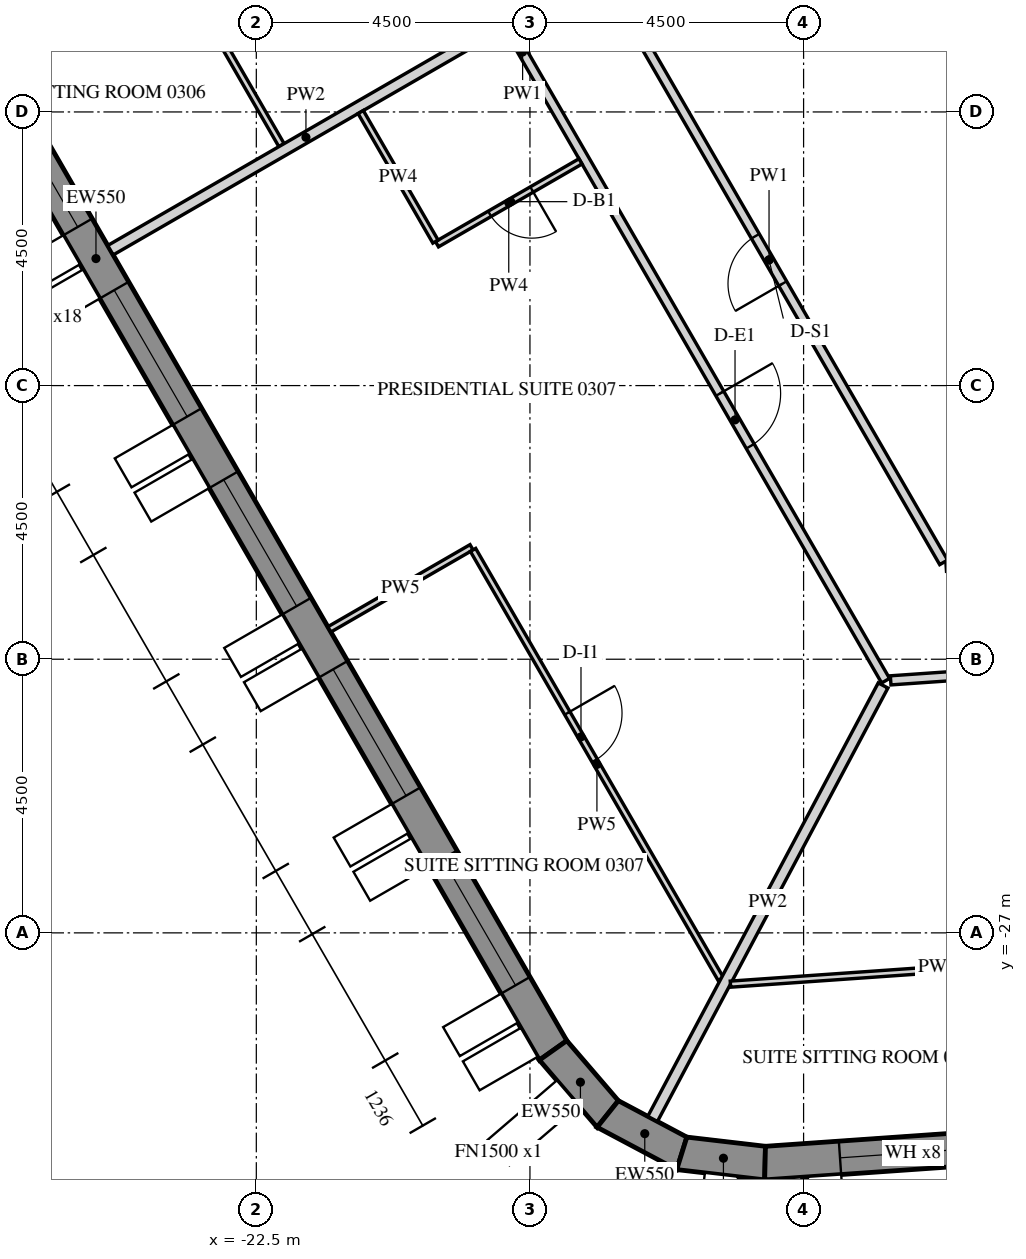
"""IFC4 building model, lengths in metres.
Left out: names, types, materials, properties, quantities, classifications, styles, units other than length and angle.
Written with IfcOpenShell. Run it as: python <this file> out.ifc"""

import sys

from ifc_helpers import new_model, si_unit, direction, frame, frame_2d, origin, place, context, subcontext, project, spatial, polyline, rectangle, outline, extrude, element, fill, save


model = new_model("IFC4")
c1 = context("Model", 3, precision=1e-05, world=origin(), true_north=direction((0.0, 1.0)))
c2 = subcontext(c1, "Body", "Model", "MODEL_VIEW")
j1 = project(units=[si_unit("LENGTHUNIT", "METRE"), si_unit("PLANEANGLEUNIT", "RADIAN")], contexts=[c1])
p1 = place(None, origin())
s1 = spatial("IfcSite", under=j1, at=p1, CompositionType="ELEMENT")
p2 = place(p1, origin())
s2 = spatial("IfcBuilding", under=s1, at=p2, CompositionType="ELEMENT")
p3 = place(p2, frame((0.0, 0.0, 60.9)))
s3 = spatial("IfcBuildingStorey", under=s2, at=p3, CompositionType="ELEMENT", Elevation=60.9)
p4 = place(p3, frame((-32.655, -2.89, -0.15), z_axis=(0.0, 0.0, 1.0), x_axis=(0.499997711317, -0.866026725152, 0.0)))
e1 = element("IfcWall", 1, at=p4, inside=s3, PredefinedType="SOLIDWALL", context=c2, shape_type="SweptSolid", body=[
    extrude(outline(polyline([(-0.022, -0.275), (30.097, -0.275), (30.045, 0.275), (0.022, 0.275), (-0.022, -0.275)])), origin(), (0.0, 0.0, 1.0), 3.9),
])
p5 = place(p4, frame((1.236, 0.0, 1.05)))
e2 = element("IfcOpeningElement", 2, at=p5, cuts=e1, PredefinedType="OPENING", context=c2, shape_type="SweptSolid", body=[
    extrude(rectangle(XDim=2.4, YDim=2.4, at=frame_2d((1.2, 1.2))), frame((0.0, 0.285, 0.0), z_axis=(0.0, -1.0, 0.0), x_axis=(1.0, 0.0, 0.0)), (0.0, 0.0, 1.0), 0.57),
])
p6 = place(p4, frame((4.835, 0.0, 1.05)))
e3 = element("IfcOpeningElement", 3, at=p6, cuts=e1, PredefinedType="OPENING", context=c2, shape_type="SweptSolid", body=[
    extrude(rectangle(XDim=2.4, YDim=2.4, at=frame_2d((1.2, 1.2))), frame((0.0, 0.285, 0.0), z_axis=(0.0, -1.0, 0.0), x_axis=(1.0, 0.0, 0.0)), (0.0, 0.0, 1.0), 0.57),
])
p7 = place(p4, frame((8.436, 0.0, 1.05)))
e4 = element("IfcOpeningElement", 4, at=p7, cuts=e1, PredefinedType="OPENING", context=c2, shape_type="SweptSolid", body=[
    extrude(rectangle(XDim=2.4, YDim=2.4, at=frame_2d((1.2, 1.2))), frame((0.0, 0.285, 0.0), z_axis=(0.0, -1.0, 0.0), x_axis=(1.0, 0.0, 0.0)), (0.0, 0.0, 1.0), 0.57),
])
p8 = place(p4, frame((12.035, 0.0, 1.05)))
e5 = element("IfcOpeningElement", 5, at=p8, cuts=e1, PredefinedType="OPENING", context=c2, shape_type="SweptSolid", body=[
    extrude(rectangle(XDim=2.4, YDim=2.4, at=frame_2d((1.2, 1.2))), frame((0.0, 0.285, 0.0), z_axis=(0.0, -1.0, 0.0), x_axis=(1.0, 0.0, 0.0)), (0.0, 0.0, 1.0), 0.57),
])
p9 = place(p4, frame((15.635, 0.0, 1.05)))
e6 = element("IfcOpeningElement", 6, at=p9, cuts=e1, PredefinedType="OPENING", context=c2, shape_type="SweptSolid", body=[
    extrude(rectangle(XDim=2.4, YDim=2.4, at=frame_2d((1.2, 1.2))), frame((0.0, 0.285, 0.0), z_axis=(0.0, -1.0, 0.0), x_axis=(1.0, 0.0, 0.0)), (0.0, 0.0, 1.0), 0.57),
])
p10 = place(p4, frame((19.236, 0.0, 1.05)))
e7 = element("IfcOpeningElement", 7, at=p10, cuts=e1, PredefinedType="OPENING", context=c2, shape_type="SweptSolid", body=[
    extrude(rectangle(XDim=2.4, YDim=2.4, at=frame_2d((1.2, 1.2))), frame((0.0, 0.285, 0.0), z_axis=(0.0, -1.0, 0.0), x_axis=(1.0, 0.0, 0.0)), (0.0, 0.0, 1.0), 0.57),
])
p11 = place(p4, frame((22.835, 0.0, 1.05)))
e8 = element("IfcOpeningElement", 8, at=p11, cuts=e1, PredefinedType="OPENING", context=c2, shape_type="SweptSolid", body=[
    extrude(rectangle(XDim=2.4, YDim=2.4, at=frame_2d((1.2, 1.2))), frame((0.0, 0.285, 0.0), z_axis=(0.0, -1.0, 0.0), x_axis=(1.0, 0.0, 0.0)), (0.0, 0.0, 1.0), 0.57),
])
p12 = place(p4, frame((26.436, 0.0, 1.05)))
e9 = element("IfcOpeningElement", 9, at=p12, cuts=e1, PredefinedType="OPENING", context=c2, shape_type="SweptSolid", body=[
    extrude(rectangle(XDim=2.4, YDim=2.4, at=frame_2d((1.2, 1.2))), frame((0.0, 0.285, 0.0), z_axis=(0.0, -1.0, 0.0), x_axis=(1.0, 0.0, 0.0)), (0.0, 0.0, 1.0), 0.57),
])
p13 = place(p3, frame((-17.619, -28.932, -0.15), z_axis=(0.0, 0.0, 1.0), x_axis=(0.651621950847, -0.758543890078, 0.0)))
e10 = element("IfcWall", 10, at=p13, inside=s3, PredefinedType="SOLIDWALL", context=c2, shape_type="SweptSolid", body=[
    extrude(outline(polyline([(-0.026, -0.275), (1.431, -0.275), (1.327, 0.275), (0.026, 0.275), (-0.026, -0.275)])), origin(), (0.0, 0.0, 1.0), 3.9),
])
p14 = place(p3, frame((-16.721, -29.979, -0.15), z_axis=(0.0, 0.0, 1.0), x_axis=(0.882994189209, -0.469383917304, 0.0)))
e11 = element("IfcWall", 11, at=p14, inside=s3, PredefinedType="SOLIDWALL", context=c2, shape_type="SweptSolid", body=[
    extrude(outline(polyline([(-0.052, -0.275), (1.431, -0.275), (1.327, 0.275), (0.052, 0.275), (-0.052, -0.275)])), origin(), (0.0, 0.0, 1.0), 3.9),
])
p15 = place(p3, frame((-15.503, -30.626, -0.15), z_axis=(0.0, 0.0, 1.0), x_axis=(0.993232537394, -0.11614269956, 0.0)))
e12 = element("IfcWall", 12, at=p15, inside=s3, PredefinedType="SOLIDWALL", context=c2, shape_type="SweptSolid", body=[
    extrude(outline(polyline([(-0.052, -0.275), (1.405, -0.275), (1.353, 0.275), (0.052, 0.275), (-0.052, -0.275)])), origin(), (0.0, 0.0, 1.0), 3.9),
])
p16 = place(p3, frame((-14.134, -30.786, -0.15), z_axis=(0.0, 0.0, 1.0), x_axis=(0.997564037441, 0.069756657061, 0.0)))
e13 = element("IfcWall", 13, at=p16, inside=s3, PredefinedType="SOLIDWALL", context=c2, shape_type="SweptSolid", body=[
    extrude(outline(polyline([(-0.026, -0.275), (30.094, -0.275), (30.049, 0.275), (0.026, 0.275), (-0.026, -0.275)])), origin(), (0.0, 0.0, 1.0), 3.9),
])
p17 = place(p16, frame((1.236, 0.0, 1.05)))
e14 = element("IfcOpeningElement", 14, at=p17, cuts=e13, PredefinedType="OPENING", context=c2, shape_type="SweptSolid", body=[
    extrude(rectangle(XDim=2.4, YDim=2.4, at=frame_2d((1.2, 1.2))), frame((0.0, 0.285, 0.0), z_axis=(0.0, -1.0, 0.0), x_axis=(1.0, 0.0, 0.0)), (0.0, 0.0, 1.0), 0.57),
])
p18 = place(p16, frame((4.835, 0.0, 1.05)))
e15 = element("IfcOpeningElement", 15, at=p18, cuts=e13, PredefinedType="OPENING", context=c2, shape_type="SweptSolid", body=[
    extrude(rectangle(XDim=2.4, YDim=2.4, at=frame_2d((1.2, 1.2))), frame((0.0, 0.285, 0.0), z_axis=(0.0, -1.0, 0.0), x_axis=(1.0, 0.0, 0.0)), (0.0, 0.0, 1.0), 0.57),
])
p19 = place(p16, frame((8.436, 0.0, 1.05)))
e16 = element("IfcOpeningElement", 16, at=p19, cuts=e13, PredefinedType="OPENING", context=c2, shape_type="SweptSolid", body=[
    extrude(rectangle(XDim=2.4, YDim=2.4, at=frame_2d((1.2, 1.2))), frame((0.0, 0.285, 0.0), z_axis=(0.0, -1.0, 0.0), x_axis=(1.0, 0.0, 0.0)), (0.0, 0.0, 1.0), 0.57),
])
p20 = place(p16, frame((12.035, 0.0, 1.05)))
e17 = element("IfcOpeningElement", 17, at=p20, cuts=e13, PredefinedType="OPENING", context=c2, shape_type="SweptSolid", body=[
    extrude(rectangle(XDim=2.4, YDim=2.4, at=frame_2d((1.2, 1.2))), frame((0.0, 0.285, 0.0), z_axis=(0.0, -1.0, 0.0), x_axis=(1.0, 0.0, 0.0)), (0.0, 0.0, 1.0), 0.57),
])
p21 = place(p16, frame((15.635, 0.0, 1.05)))
e18 = element("IfcOpeningElement", 18, at=p21, cuts=e13, PredefinedType="OPENING", context=c2, shape_type="SweptSolid", body=[
    extrude(rectangle(XDim=2.4, YDim=2.4, at=frame_2d((1.2, 1.2))), frame((0.0, 0.285, 0.0), z_axis=(0.0, -1.0, 0.0), x_axis=(1.0, 0.0, 0.0)), (0.0, 0.0, 1.0), 0.57),
])
p22 = place(p16, frame((19.236, 0.0, 1.05)))
e19 = element("IfcOpeningElement", 19, at=p22, cuts=e13, PredefinedType="OPENING", context=c2, shape_type="SweptSolid", body=[
    extrude(rectangle(XDim=2.4, YDim=2.4, at=frame_2d((1.2, 1.2))), frame((0.0, 0.285, 0.0), z_axis=(0.0, -1.0, 0.0), x_axis=(1.0, 0.0, 0.0)), (0.0, 0.0, 1.0), 0.57),
])
p23 = place(p16, frame((22.835, 0.0, 1.05)))
e20 = element("IfcOpeningElement", 20, at=p23, cuts=e13, PredefinedType="OPENING", context=c2, shape_type="SweptSolid", body=[
    extrude(rectangle(XDim=2.4, YDim=2.4, at=frame_2d((1.2, 1.2))), frame((0.0, 0.285, 0.0), z_axis=(0.0, -1.0, 0.0), x_axis=(1.0, 0.0, 0.0)), (0.0, 0.0, 1.0), 0.57),
])
p24 = place(p16, frame((26.436, 0.0, 1.05)))
e21 = element("IfcOpeningElement", 21, at=p24, cuts=e13, PredefinedType="OPENING", context=c2, shape_type="SweptSolid", body=[
    extrude(rectangle(XDim=2.4, YDim=2.4, at=frame_2d((1.2, 1.2))), frame((0.0, 0.285, 0.0), z_axis=(0.0, -1.0, 0.0), x_axis=(1.0, 0.0, 0.0)), (0.0, 0.0, 1.0), 0.57),
])
p25 = place(p3, frame((-15.819, 0.0, -0.15), z_axis=(0.0, 0.0, 1.0), x_axis=(0.499999880136, -0.866025472988, 0.0)))
e22 = element("IfcWall", 22, at=p25, inside=s3, PredefinedType="SHEAR", context=c2, shape_type="SweptSolid", body=[
    extrude(outline(polyline([(-0.173, -0.3), (15.993, -0.3), (15.646, 0.3), (0.173, 0.3), (-0.173, -0.3)])), origin(), (0.0, 0.0, 1.0), 3.9),
])
p26 = place(p25, frame((6.981, 0.0, 0.15)))
e23 = element("IfcOpeningElement", 23, at=p26, cuts=e22, PredefinedType="OPENING", context=c2, shape_type="SweptSolid", body=[
    extrude(rectangle(XDim=1.8, YDim=2.4, at=frame_2d((0.9, 1.2))), frame((0.0, 0.31, 0.0), z_axis=(0.0, -1.0, 0.0), x_axis=(1.0, 0.0, 0.0)), (0.0, 0.0, 1.0), 0.62),
])
p27 = place(p3, frame((-24.09, -2.175, 0.0), z_axis=(0.0, 0.0, 1.0), x_axis=(0.499996832073, -0.86602723278, 0.0)))
e24 = element("IfcWall", 24, at=p27, inside=s3, PredefinedType="PARTITIONING", context=c2, shape_type="SweptSolid", body=[
    extrude(rectangle(XDim=23.877, YDim=0.15, at=frame_2d((11.938, 0.0))), origin(), (0.0, 0.0, 1.0), 2.988),
])
p28 = place(p27, frame((6.443, 0.0, 0.0)))
e25 = element("IfcOpeningElement", 25, at=p28, cuts=e24, PredefinedType="OPENING", context=c2, shape_type="SweptSolid", body=[
    extrude(rectangle(XDim=1.0, YDim=2.1, at=frame_2d((0.5, 1.05))), frame((0.0, 0.085, 0.0), z_axis=(0.0, -1.0, 0.0), x_axis=(1.0, 0.0, 0.0)), (0.0, 0.0, 1.0), 0.17),
])
p29 = place(p27, frame((18.425, 0.0, 0.0)))
e26 = element("IfcOpeningElement", 26, at=p29, cuts=e24, PredefinedType="OPENING", context=c2, shape_type="SweptSolid", body=[
    extrude(rectangle(XDim=1.0, YDim=2.1, at=frame_2d((0.5, 1.05))), frame((0.0, 0.085, 0.0), z_axis=(0.0, -1.0, 0.0), x_axis=(1.0, 0.0, 0.0)), (0.0, 0.0, 1.0), 0.17),
])
p30 = place(p3, frame((-12.068, -22.847, 0.0), z_axis=(0.0, 0.0, 1.0), x_axis=(0.99756437486, 0.069751831595, 0.0)))
e27 = element("IfcWall", 27, at=p30, inside=s3, PredefinedType="PARTITIONING", context=c2, shape_type="SweptSolid", body=[
    extrude(rectangle(XDim=22.002, YDim=0.15, at=frame_2d((11.001, 0.0))), origin(), (0.0, 0.0, 1.0), 2.988),
])
p31 = place(p30, frame((4.469, 0.0, 0.0)))
e28 = element("IfcOpeningElement", 28, at=p31, cuts=e27, PredefinedType="OPENING", context=c2, shape_type="SweptSolid", body=[
    extrude(rectangle(XDim=1.0, YDim=2.1, at=frame_2d((0.5, 1.05))), frame((0.0, 0.085, 0.0), z_axis=(0.0, -1.0, 0.0), x_axis=(1.0, 0.0, 0.0)), (0.0, 0.0, 1.0), 0.17),
])
p32 = place(p30, frame((17.912, 0.0, 0.0)))
e29 = element("IfcOpeningElement", 29, at=p32, cuts=e27, PredefinedType="OPENING", context=c2, shape_type="SweptSolid", body=[
    extrude(rectangle(XDim=1.0, YDim=2.1, at=frame_2d((0.5, 1.05))), frame((0.0, 0.085, 0.0), z_axis=(0.0, -1.0, 0.0), x_axis=(1.0, 0.0, 0.0)), (0.0, 0.0, 1.0), 0.17),
])
p33 = place(p3, frame((-0.825, -20.257, 0.0), z_axis=(0.0, 0.0, 1.0), x_axis=(-0.9975635143, -0.069764137903, 0.0)))
e30 = element("IfcWall", 30, at=p33, inside=s3, PredefinedType="PARTITIONING", context=c2, shape_type="SweptSolid", body=[
    extrude(rectangle(XDim=10.355, YDim=0.15, at=frame_2d((5.177, 0.0))), origin(), (0.0, 0.0, 1.0), 2.988),
])
p34 = place(p3, frame((-11.197, -20.907, 0.0), z_axis=(0.0, 0.0, 1.0), x_axis=(-0.500004557924, 0.86602277225, 0.0)))
e31 = element("IfcWall", 31, at=p34, inside=s3, PredefinedType="PARTITIONING", context=c2, shape_type="SweptSolid", body=[
    extrude(rectangle(XDim=11.487, YDim=0.15, at=frame_2d((5.743, 0.0))), origin(), (0.0, 0.0, 1.0), 2.988),
])
p35 = place(p34, frame((5.293, 0.0, 0.0)))
e32 = element("IfcOpeningElement", 32, at=p35, cuts=e31, PredefinedType="OPENING", context=c2, shape_type="SweptSolid", body=[
    extrude(rectangle(XDim=0.9, YDim=2.1, at=frame_2d((0.45, 1.05))), frame((0.0, 0.085, 0.0), z_axis=(0.0, -1.0, 0.0), x_axis=(1.0, 0.0, 0.0)), (0.0, 0.0, 1.0), 0.17),
])
p36 = place(p3, frame((-25.616, -7.932, 0.0), z_axis=(0.0, 0.0, 1.0), x_axis=(0.499995846692, -0.866027801685, 0.0)))
e33 = element("IfcWall", 33, at=p36, inside=s3, PredefinedType="PARTITIONING", context=c2, shape_type="SweptSolid", body=[
    extrude(rectangle(XDim=7.06, YDim=0.1, at=frame_2d((3.53, 0.0))), origin(), (0.0, 0.0, 1.0), 2.988),
])
p37 = place(p36, frame((3.1, 0.0, 0.0)))
e34 = element("IfcOpeningElement", 34, at=p37, cuts=e33, PredefinedType="OPENING", context=c2, shape_type="SweptSolid", body=[
    extrude(rectangle(XDim=0.9, YDim=2.1, at=frame_2d((0.45, 1.05))), frame((0.0, 0.06, 0.0), z_axis=(0.0, -1.0, 0.0), x_axis=(1.0, 0.0, 0.0)), (0.0, 0.0, 1.0), 0.12),
])
p38 = place(p3, frame((-24.899, -15.774, 0.0), z_axis=(0.0, 0.0, 1.0), x_axis=(0.866028983062, 0.499993800457, 0.0)))
e35 = element("IfcWall", 35, at=p38, inside=s3, PredefinedType="PARTITIONING", context=c2, shape_type="SweptSolid", body=[
    extrude(rectangle(XDim=7.425, YDim=0.18, at=frame_2d((3.712, 0.0))), origin(), (0.0, 0.0, 1.0), 2.988),
])
p39 = place(p3, frame((-17.169, -14.313, 0.0), z_axis=(0.0, 0.0, 1.0), x_axis=(-0.866012511928, -0.500022328685, 0.0)))
e36 = element("IfcWall", 36, at=p39, inside=s3, PredefinedType="PARTITIONING", context=c2, shape_type="SweptSolid", body=[
    extrude(rectangle(XDim=2.725, YDim=0.1, at=frame_2d((1.363, 0.0))), origin(), (0.0, 0.0, 1.0), 2.988),
])
p40 = place(p39, frame((0.925, 0.0, 0.0)))
e37 = element("IfcOpeningElement", 37, at=p40, cuts=e36, PredefinedType="OPENING", context=c2, shape_type="SweptSolid", body=[
    extrude(rectangle(XDim=0.8, YDim=2.1, at=frame_2d((0.4, 1.05))), frame((0.0, 0.06, 0.0), z_axis=(0.0, -1.0, 0.0), x_axis=(1.0, 0.0, 0.0)), (0.0, 0.0, 1.0), 0.12),
])
p41 = place(p3, frame((-19.554, -15.632, 0.0), z_axis=(0.0, 0.0, 1.0), x_axis=(-0.500003092839, 0.866023618125, 0.0)))
e38 = element("IfcWall", 38, at=p41, inside=s3, PredefinedType="PARTITIONING", context=c2, shape_type="SweptSolid", body=[
    extrude(rectangle(XDim=2.46, YDim=0.1, at=frame_2d((1.23, 0.0))), origin(), (0.0, 0.0, 1.0), 2.988),
])
p42 = place(p3, frame((-21.299, -22.009, 0.0), z_axis=(0.0, 0.0, 1.0), x_axis=(0.86599734893, 0.500048589285, 0.0)))
e39 = element("IfcWall", 39, at=p42, inside=s3, PredefinedType="PARTITIONING", context=c2, shape_type="SweptSolid", body=[
    extrude(rectangle(XDim=2.7, YDim=0.1, at=frame_2d((1.35, 0.0))), origin(), (0.0, 0.0, 1.0), 2.988),
])
p43 = place(p3, frame((-18.936, -20.702, 0.0), z_axis=(0.0, 0.0, 1.0), x_axis=(0.49998354646, -0.866034903032, 0.0)))
e40 = element("IfcWall", 40, at=p43, inside=s3, PredefinedType="PARTITIONING", context=c2, shape_type="SweptSolid", body=[
    extrude(rectangle(XDim=8.148, YDim=0.1, at=frame_2d((4.074, 0.0))), origin(), (0.0, 0.0, 1.0), 2.988),
])
p44 = place(p43, frame((3.1, 0.0, 0.0)))
e41 = element("IfcOpeningElement", 41, at=p44, cuts=e40, PredefinedType="OPENING", context=c2, shape_type="SweptSolid", body=[
    extrude(rectangle(XDim=0.9, YDim=2.1, at=frame_2d((0.45, 1.05))), frame((0.0, 0.06, 0.0), z_axis=(0.0, -1.0, 0.0), x_axis=(1.0, 0.0, 0.0)), (0.0, 0.0, 1.0), 0.12),
])
p45 = place(p3, frame((-15.983, -30.059, 0.0), z_axis=(0.0, 0.0, 1.0), x_axis=(0.469476547643, 0.882944942346, 0.0)))
e42 = element("IfcWall", 42, at=p45, inside=s3, PredefinedType="PARTITIONING", context=c2, shape_type="SweptSolid", body=[
    extrude(rectangle(XDim=8.073, YDim=0.18, at=frame_2d((4.037, 0.0))), origin(), (0.0, 0.0, 1.0), 2.988),
])
p46 = place(p3, frame((-14.703, -27.844, 0.0), z_axis=(0.0, 0.0, 1.0), x_axis=(0.997562679052, 0.069776080157, 0.0)))
e43 = element("IfcWall", 43, at=p46, inside=s3, PredefinedType="PARTITIONING", context=c2, shape_type="SweptSolid", body=[
    extrude(rectangle(XDim=8.198, YDim=0.1, at=frame_2d((4.099, 0.0))), origin(), (0.0, 0.0, 1.0), 2.988),
])
p47 = place(p46, frame((4.148, 0.0, 0.0)))
e44 = element("IfcOpeningElement", 44, at=p47, cuts=e43, PredefinedType="OPENING", context=c2, shape_type="SweptSolid", body=[
    extrude(rectangle(XDim=0.9, YDim=2.1, at=frame_2d((0.45, 1.05))), frame((0.0, 0.06, 0.0), z_axis=(0.0, -1.0, 0.0), x_axis=(1.0, 0.0, 0.0)), (0.0, 0.0, 1.0), 0.12),
])
p48 = place(p8, frame((0.0, 0.205, 0.0)))
e45 = element("IfcWindow", 45, at=p48, inside=s3, PartitioningType="DOUBLE_PANEL_VERTICAL", PredefinedType="WINDOW", context=c2, shape_type="SweptSolid", body=[
    extrude(rectangle(XDim=2.4, YDim=2.4, at=frame_2d((1.2, 1.2))), frame((0.0, 0.03, 0.0), z_axis=(0.0, -1.0, 0.0), x_axis=(1.0, 0.0, 0.0)), (0.0, 0.0, 1.0), 0.06),
])
fill(e5, e45)
p49 = place(p9, frame((0.0, 0.205, 0.0)))
e46 = element("IfcWindow", 46, at=p49, inside=s3, PartitioningType="DOUBLE_PANEL_VERTICAL", PredefinedType="WINDOW", context=c2, shape_type="SweptSolid", body=[
    extrude(rectangle(XDim=2.4, YDim=2.4, at=frame_2d((1.2, 1.2))), frame((0.0, 0.03, 0.0), z_axis=(0.0, -1.0, 0.0), x_axis=(1.0, 0.0, 0.0)), (0.0, 0.0, 1.0), 0.06),
])
fill(e6, e46)
p50 = place(p10, frame((0.0, 0.205, 0.0)))
e47 = element("IfcWindow", 47, at=p50, inside=s3, PartitioningType="DOUBLE_PANEL_VERTICAL", PredefinedType="WINDOW", context=c2, shape_type="SweptSolid", body=[
    extrude(rectangle(XDim=2.4, YDim=2.4, at=frame_2d((1.2, 1.2))), frame((0.0, 0.03, 0.0), z_axis=(0.0, -1.0, 0.0), x_axis=(1.0, 0.0, 0.0)), (0.0, 0.0, 1.0), 0.06),
])
fill(e7, e47)
p51 = place(p11, frame((0.0, 0.205, 0.0)))
e48 = element("IfcWindow", 48, at=p51, inside=s3, PartitioningType="DOUBLE_PANEL_VERTICAL", PredefinedType="WINDOW", context=c2, shape_type="SweptSolid", body=[
    extrude(rectangle(XDim=2.4, YDim=2.4, at=frame_2d((1.2, 1.2))), frame((0.0, 0.03, 0.0), z_axis=(0.0, -1.0, 0.0), x_axis=(1.0, 0.0, 0.0)), (0.0, 0.0, 1.0), 0.06),
])
fill(e8, e48)
p52 = place(p12, frame((0.0, 0.205, 0.0)))
e49 = element("IfcWindow", 49, at=p52, inside=s3, PartitioningType="DOUBLE_PANEL_VERTICAL", PredefinedType="WINDOW", context=c2, shape_type="SweptSolid", body=[
    extrude(rectangle(XDim=2.4, YDim=2.4, at=frame_2d((1.2, 1.2))), frame((0.0, 0.03, 0.0), z_axis=(0.0, -1.0, 0.0), x_axis=(1.0, 0.0, 0.0)), (0.0, 0.0, 1.0), 0.06),
])
fill(e9, e49)
p53 = place(p17, frame((0.0, 0.205, 0.0)))
e50 = element("IfcWindow", 50, at=p53, inside=s3, PartitioningType="DOUBLE_PANEL_VERTICAL", PredefinedType="WINDOW", context=c2, shape_type="SweptSolid", body=[
    extrude(rectangle(XDim=2.4, YDim=2.4, at=frame_2d((1.2, 1.2))), frame((0.0, 0.03, 0.0), z_axis=(0.0, -1.0, 0.0), x_axis=(1.0, 0.0, 0.0)), (0.0, 0.0, 1.0), 0.06),
])
fill(e14, e50)
p54 = place(p29, origin())
e51 = element("IfcDoor", 51, at=p54, inside=s3, OperationType="SINGLE_SWING_LEFT", PredefinedType="DOOR", context=c2, shape_type="SweptSolid", body=[
    extrude(rectangle(XDim=1.0, YDim=2.1, at=frame_2d((0.5, 1.05))), frame((0.0, 0.025, 0.0), z_axis=(0.0, -1.0, 0.0), x_axis=(1.0, 0.0, 0.0)), (0.0, 0.0, 1.0), 0.05),
])
fill(e26, e51)
p55 = place(p40, origin())
e52 = element("IfcDoor", 52, at=p55, inside=s3, OperationType="SINGLE_SWING_RIGHT", PredefinedType="DOOR", context=c2, shape_type="SweptSolid", body=[
    extrude(rectangle(XDim=0.8, YDim=2.1, at=frame_2d((0.4, 1.05))), frame((0.0, 0.025, 0.0), z_axis=(0.0, -1.0, 0.0), x_axis=(1.0, 0.0, 0.0)), (0.0, 0.0, 1.0), 0.05),
])
fill(e37, e52)
p56 = place(p44, origin())
e53 = element("IfcDoor", 53, at=p56, inside=s3, OperationType="SINGLE_SWING_RIGHT", PredefinedType="DOOR", context=c2, shape_type="SweptSolid", body=[
    extrude(rectangle(XDim=0.9, YDim=2.1, at=frame_2d((0.45, 1.05))), frame((0.0, 0.025, 0.0), z_axis=(0.0, -1.0, 0.0), x_axis=(1.0, 0.0, 0.0)), (0.0, 0.0, 1.0), 0.05),
])
fill(e41, e53)
p57 = place(p35, origin())
e54 = element("IfcDoor", 54, at=p57, inside=s3, OperationType="SINGLE_SWING_RIGHT", PredefinedType="DOOR", context=c2, shape_type="SweptSolid", body=[
    extrude(rectangle(XDim=0.9, YDim=2.1, at=frame_2d((0.45, 1.05))), frame((0.0, 0.025, 0.0), z_axis=(0.0, -1.0, 0.0), x_axis=(1.0, 0.0, 0.0)), (0.0, 0.0, 1.0), 0.05),
])
fill(e32, e54)
save(model, sys.argv[1])
